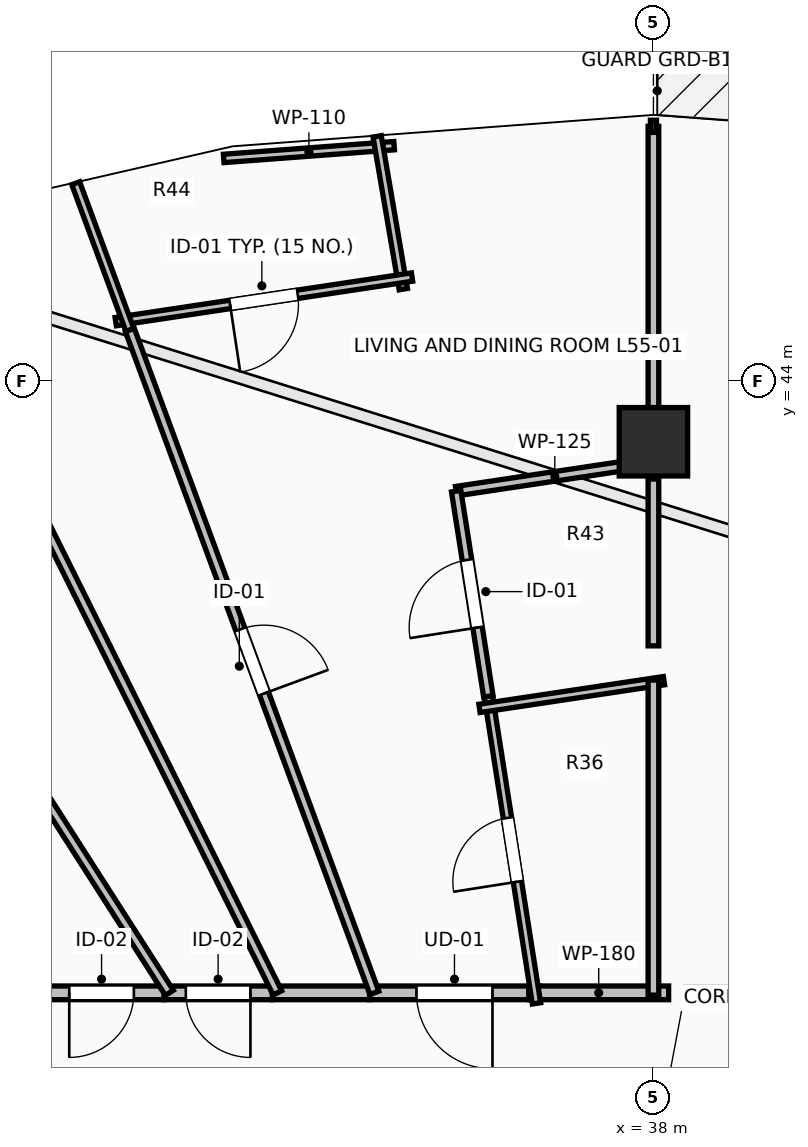
"""IFC4 building model, lengths in metres.
Left out: names, types, materials, properties, quantities, classifications, styles, units other than length and angle.
Written with IfcOpenShell. Run it as: python <this file> out.ifc"""

import sys

from ifc_helpers import new_model, si_unit, direction, frame, frame_2d, origin, origin_2d, place, context, subcontext, project, spatial, rectangle, extrude, element, fill, save


model = new_model("IFC4")
c1 = context("Model", 3, precision=1e-05, world=origin(), true_north=direction((0.0, 1.0)))
c2 = subcontext(c1, "Body", "Model", "MODEL_VIEW")
j1 = project(units=[si_unit("LENGTHUNIT", "METRE"), si_unit("PLANEANGLEUNIT", "RADIAN")], contexts=[c1])
p1 = place(None, origin())
s1 = spatial("IfcSite", under=j1, at=p1, CompositionType="ELEMENT")
p2 = place(p1, origin())
s2 = spatial("IfcBuilding", under=s1, at=p2, CompositionType="ELEMENT")
p3 = place(p2, frame((0.0, 0.0, 203.65)))
s3 = spatial("IfcBuildingStorey", under=s2, at=p3, CompositionType="ELEMENT", Elevation=203.65)
p4 = place(p3, frame((38.0, 43.2, 0.0), z_axis=(0.0, 0.0, 1.0), x_axis=(0.0, 1.0, 0.0)))
e1 = element("IfcColumn", 1, at=p4, inside=s3, PredefinedType="COLUMN", context=c2, shape_type="SweptSolid", body=[
    extrude(rectangle(XDim=0.9, YDim=0.9, at=origin_2d()), origin(), (0.0, 0.0, 1.0), 3.55),
])
p5 = place(p3, frame((36.5, 35.95, 0.0), z_axis=(0.0, 0.0, 1.0), x_axis=(-1.0, 0.0, 0.0)))
e2 = element("IfcWall", 2, at=p5, inside=s3, PredefinedType="PARTITIONING", context=c2, shape_type="SweptSolid", body=[
    extrude(rectangle(XDim=2.235, YDim=0.18, at=frame_2d((1.118, 0.0))), origin(), (0.0, 0.0, 1.0), 3.29),
])
p6 = place(p5, frame((0.617, 0.0, 0.0)))
e3 = element("IfcOpeningElement", 3, at=p6, cuts=e2, PredefinedType="OPENING", context=c2, shape_type="SweptSolid", body=[
    extrude(rectangle(XDim=1.0, YDim=2.15, at=frame_2d((0.5, 1.075))), frame((0.0, 0.105, 0.0), z_axis=(0.0, -1.0, 0.0), x_axis=(1.0, 0.0, 0.0)), (0.0, 0.0, 1.0), 0.21),
])
p7 = place(p3, frame((38.2, 35.95, 0.0), z_axis=(0.0, 0.0, 1.0), x_axis=(-1.0, 0.0, 0.0)))
e4 = element("IfcWall", 4, at=p7, inside=s3, PredefinedType="PARTITIONING", context=c2, shape_type="SweptSolid", body=[
    extrude(rectangle(XDim=1.84, YDim=0.18, at=frame_2d((0.92, 0.0))), origin(), (0.0, 0.0, 1.0), 3.29),
])
p8 = place(p3, frame((34.265, 35.95, 0.0), z_axis=(0.0, 0.0, 1.0), x_axis=(-1.0, 0.0, 0.0)))
e5 = element("IfcWall", 5, at=p8, inside=s3, PredefinedType="PARTITIONING", context=c2, shape_type="SweptSolid", body=[
    extrude(rectangle(XDim=1.279, YDim=0.18, at=frame_2d((0.639, 0.0))), origin(), (0.0, 0.0, 1.0), 3.29),
])
p9 = place(p3, frame((32.986, 35.95, 0.0), z_axis=(0.0, 0.0, 1.0), x_axis=(-1.0, 0.0, 0.0)))
e6 = element("IfcWall", 6, at=p9, inside=s3, PredefinedType="PARTITIONING", context=c2, shape_type="SweptSolid", body=[
    extrude(rectangle(XDim=1.426, YDim=0.18, at=frame_2d((0.713, 0.0))), origin(), (0.0, 0.0, 1.0), 3.29),
])
p10 = place(p9, frame((0.288, 0.0, 0.0)))
e7 = element("IfcOpeningElement", 7, at=p10, cuts=e6, PredefinedType="OPENING", context=c2, shape_type="SweptSolid", body=[
    extrude(rectangle(XDim=0.85, YDim=2.1, at=frame_2d((0.425, 1.05))), frame((0.0, 0.105, 0.0), z_axis=(0.0, -1.0, 0.0), x_axis=(1.0, 0.0, 0.0)), (0.0, 0.0, 1.0), 0.21),
])
p11 = place(p3, frame((31.56, 35.95, 0.0), z_axis=(0.0, 0.0, 1.0), x_axis=(-1.0, 0.0, 0.0)))
e8 = element("IfcWall", 8, at=p11, inside=s3, PredefinedType="PARTITIONING", context=c2, shape_type="SweptSolid", body=[
    extrude(rectangle(XDim=1.641, YDim=0.18, at=frame_2d((0.821, 0.0))), origin(), (0.0, 0.0, 1.0), 2.482),
])
p12 = place(p11, frame((0.396, 0.0, 0.0)))
e9 = element("IfcOpeningElement", 9, at=p12, cuts=e8, PredefinedType="OPENING", context=c2, shape_type="SweptSolid", body=[
    extrude(rectangle(XDim=0.85, YDim=2.1, at=frame_2d((0.425, 1.05))), frame((0.0, 0.105, 0.0), z_axis=(0.0, -1.0, 0.0), x_axis=(1.0, 0.0, 0.0)), (0.0, 0.0, 1.0), 0.21),
])
p13 = place(p3, frame((36.462, 35.812, 0.0), z_axis=(0.0, 0.0, 1.0), x_axis=(-0.154883213323, 0.987932786292, 0.0)))
e10 = element("IfcWall", 10, at=p13, inside=s3, PredefinedType="PARTITIONING", context=c2, shape_type="SweptSolid", body=[
    extrude(rectangle(XDim=4.089, YDim=0.11, at=frame_2d((2.044, 0.0))), origin(), (0.0, 0.0, 1.0), 2.936),
])
p14 = place(p13, frame((1.619, 0.0, 0.0)))
e11 = element("IfcOpeningElement", 11, at=p14, cuts=e10, PredefinedType="OPENING", context=c2, shape_type="SweptSolid", body=[
    extrude(rectangle(XDim=0.85, YDim=2.1, at=frame_2d((0.425, 1.05))), frame((0.0, 0.07, 0.0), z_axis=(0.0, -1.0, 0.0), x_axis=(1.0, 0.0, 0.0)), (0.0, 0.0, 1.0), 0.14),
])
p15 = place(p3, frame((34.589, 47.095, 0.0), z_axis=(0.0, 0.0, 1.0), x_axis=(-0.997205784552, -0.074703569226, 0.0)))
e12 = element("IfcWall", 12, at=p15, inside=s3, PredefinedType="PARTITIONING", context=c2, shape_type="SweptSolid", body=[
    extrude(rectangle(XDim=2.249, YDim=0.11, at=frame_2d((1.124, 0.0))), origin(), (0.0, 0.0, 1.0), 3.29),
])
p16 = place(p3, frame((34.365, 47.218, 0.0), z_axis=(0.0, 0.0, 1.0), x_axis=(0.168804313657, -0.985649584635, 0.0)))
e13 = element("IfcWall", 13, at=p16, inside=s3, PredefinedType="PARTITIONING", context=c2, shape_type="SweptSolid", body=[
    extrude(rectangle(XDim=2.039, YDim=0.11, at=frame_2d((1.02, 0.0))), origin(), (0.0, 0.0, 1.0), 3.29),
])
p17 = place(p3, frame((34.824, 45.367, 0.0), z_axis=(0.0, 0.0, 1.0), x_axis=(-0.988877230123, -0.148734070555, 0.0)))
e14 = element("IfcWall", 14, at=p17, inside=s3, PredefinedType="PARTITIONING", context=c2, shape_type="SweptSolid", body=[
    extrude(rectangle(XDim=3.943, YDim=0.11, at=frame_2d((1.971, 0.0))), origin(), (0.0, 0.0, 1.0), 3.29),
])
p18 = place(p17, frame((1.521, 0.0, 0.0)))
e15 = element("IfcOpeningElement", 15, at=p18, cuts=e14, PredefinedType="OPENING", context=c2, shape_type="SweptSolid", body=[
    extrude(rectangle(XDim=0.9, YDim=2.1, at=frame_2d((0.45, 1.05))), frame((0.0, 0.07, 0.0), z_axis=(0.0, -1.0, 0.0), x_axis=(1.0, 0.0, 0.0)), (0.0, 0.0, 1.0), 0.14),
])
p19 = place(p3, frame((31.113, 44.67, 0.0), z_axis=(0.0, 0.0, 1.0), x_axis=(-0.346337161188, 0.938110105894, 0.0)))
e16 = element("IfcWall", 16, at=p19, inside=s3, PredefinedType="PARTITIONING", context=c2, shape_type="SweptSolid", body=[
    extrude(rectangle(XDim=2.059, YDim=0.11, at=frame_2d((1.03, 0.0))), origin(), (0.0, 0.0, 1.0), 3.29),
])
p20 = place(p3, frame((35.405, 42.55, 0.0), z_axis=(0.0, 0.0, 1.0), x_axis=(0.988900154693, 0.148581573718, 0.0)))
e17 = element("IfcWall", 17, at=p20, inside=s3, PredefinedType="PARTITIONING", context=c2, shape_type="SweptSolid", body=[
    extrude(rectangle(XDim=2.624, YDim=0.125, at=frame_2d((1.312, 0.0))), origin(), (0.0, 0.0, 1.0), 2.482),
])
p21 = place(p3, frame((35.828, 39.851, 0.0), z_axis=(0.0, 0.0, 1.0), x_axis=(-0.154971189464, 0.987918989814, 0.0)))
e18 = element("IfcWall", 18, at=p21, inside=s3, PredefinedType="PARTITIONING", context=c2, shape_type="SweptSolid", body=[
    extrude(rectangle(XDim=2.732, YDim=0.125, at=frame_2d((1.366, 0.0))), origin(), (0.0, 0.0, 1.0), 2.482),
])
p22 = place(p21, frame((0.916, 0.0, 0.0)))
e19 = element("IfcOpeningElement", 19, at=p22, cuts=e18, PredefinedType="OPENING", context=c2, shape_type="SweptSolid", body=[
    extrude(rectangle(XDim=0.9, YDim=2.1, at=frame_2d((0.45, 1.05))), frame((0.0, 0.077, 0.0), z_axis=(0.0, -1.0, 0.0), x_axis=(1.0, 0.0, 0.0)), (0.0, 0.0, 1.0), 0.155),
])
p23 = place(p3, frame((31.112, 44.67, 0.0), z_axis=(0.0, 0.0, 1.0), x_axis=(0.346109472243, -0.938194134081, 0.0)))
e20 = element("IfcWall", 20, at=p23, inside=s3, PredefinedType="PARTITIONING", context=c2, shape_type="SweptSolid", body=[
    extrude(rectangle(XDim=9.294, YDim=0.125, at=frame_2d((4.647, 0.0))), origin(), (0.0, 0.0, 1.0), 2.482),
])
p24 = place(p23, frame((4.197, 0.0, 0.0)))
e21 = element("IfcOpeningElement", 21, at=p24, cuts=e20, PredefinedType="OPENING", context=c2, shape_type="SweptSolid", body=[
    extrude(rectangle(XDim=0.9, YDim=2.1, at=frame_2d((0.45, 1.05))), frame((0.0, 0.077, 0.0), z_axis=(0.0, -1.0, 0.0), x_axis=(1.0, 0.0, 0.0)), (0.0, 0.0, 1.0), 0.155),
])
p25 = place(p3, frame((38.138, 40.057, 0.0), z_axis=(0.0, 0.0, 1.0), x_axis=(-0.988892526147, -0.148632337431, 0.0)))
e22 = element("IfcWall", 22, at=p25, inside=s3, PredefinedType="PARTITIONING", context=c2, shape_type="SweptSolid", body=[
    extrude(rectangle(XDim=2.454, YDim=0.11, at=frame_2d((1.227, 0.0))), origin(), (0.0, 0.0, 1.0), 3.022),
])
p26 = place(p3, frame((28.091, 45.928, 0.0), z_axis=(0.0, 0.0, 1.0), x_axis=(0.445267068418, -0.895397809793, 0.0)))
e23 = element("IfcWall", 23, at=p26, inside=s3, PredefinedType="PARTITIONING", context=c2, shape_type="SweptSolid", body=[
    extrude(rectangle(XDim=11.144, YDim=0.125, at=frame_2d((5.572, 0.0))), origin(), (0.0, 0.0, 1.0), 2.482),
])
p27 = place(p3, frame((25.749, 45.138, 0.0), z_axis=(0.0, 0.0, 1.0), x_axis=(0.539168632786, -0.842197830335, 0.0)))
e24 = element("IfcWall", 24, at=p27, inside=s3, PredefinedType="PARTITIONING", context=c2, shape_type="SweptSolid", body=[
    extrude(rectangle(XDim=10.909, YDim=0.125, at=frame_2d((5.455, 0.0))), origin(), (0.0, 0.0, 1.0), 2.482),
])
p28 = place(p3, frame((47.67, 35.95, 0.0), z_axis=(0.0, 0.0, 1.0), x_axis=(-1.0, 0.0, 0.0)))
e25 = element("IfcWall", 25, at=p28, inside=s3, PredefinedType="PARTITIONING", context=c2, shape_type="SweptSolid", body=[
    extrude(rectangle(XDim=9.25, YDim=0.14, at=frame_2d((4.625, 0.0))), origin(), (0.0, 0.0, 1.0), 2.936),
])
p29 = place(p3, frame((38.0, 43.16, 0.0), z_axis=(0.0, 0.0, 1.0), x_axis=(0.0, 1.0, 0.0)))
e26 = element("IfcWall", 26, at=p29, inside=s3, PredefinedType="PARTITIONING", context=c2, shape_type="SweptSolid", body=[
    extrude(rectangle(XDim=4.19, YDim=0.14, at=frame_2d((2.095, 0.0))), origin(), (0.0, 0.0, 1.0), 3.29),
])
p30 = place(p3, frame((38.0, 35.92, 0.0), z_axis=(0.0, 0.0, 1.0), x_axis=(0.0, 1.0, 0.0)))
e27 = element("IfcWall", 27, at=p30, inside=s3, PredefinedType="PARTITIONING", context=c2, shape_type="SweptSolid", body=[
    extrude(rectangle(XDim=4.145, YDim=0.14, at=frame_2d((2.073, 0.0))), origin(), (0.0, 0.0, 1.0), 2.936),
])
p31 = place(p3, frame((38.0, 40.515, 0.0), z_axis=(0.0, 0.0, 1.0), x_axis=(0.0, 1.0, 0.0)))
e28 = element("IfcWall", 28, at=p31, inside=s3, PredefinedType="PARTITIONING", context=c2, shape_type="SweptSolid", body=[
    extrude(rectangle(XDim=2.195, YDim=0.14, at=frame_2d((1.098, 0.0))), origin(), (0.0, 0.0, 1.0), 3.29),
])
p32 = place(p6, origin())
e29 = element("IfcDoor", 29, at=p32, inside=s3, OperationType="SINGLE_SWING_LEFT", PredefinedType="DOOR", context=c2, shape_type="SweptSolid", body=[
    extrude(rectangle(XDim=1.0, YDim=2.15, at=frame_2d((0.5, 1.075))), frame((0.0, 0.025, 0.0), z_axis=(0.0, -1.0, 0.0), x_axis=(1.0, 0.0, 0.0)), (0.0, 0.0, 1.0), 0.05),
])
fill(e3, e29)
p33 = place(p14, origin())
e30 = element("IfcDoor", 30, at=p33, inside=s3, OperationType="SINGLE_SWING_LEFT", PredefinedType="DOOR", context=c2, shape_type="SweptSolid", body=[
    extrude(rectangle(XDim=0.85, YDim=2.1, at=frame_2d((0.425, 1.05))), frame((0.0, 0.025, 0.0), z_axis=(0.0, -1.0, 0.0), x_axis=(1.0, 0.0, 0.0)), (0.0, 0.0, 1.0), 0.05),
])
fill(e11, e30)
p34 = place(p18, origin())
e31 = element("IfcDoor", 31, at=p34, inside=s3, OperationType="SINGLE_SWING_RIGHT", PredefinedType="DOOR", context=c2, shape_type="SweptSolid", body=[
    extrude(rectangle(XDim=0.9, YDim=2.1, at=frame_2d((0.45, 1.05))), frame((0.0, 0.025, 0.0), z_axis=(0.0, -1.0, 0.0), x_axis=(1.0, 0.0, 0.0)), (0.0, 0.0, 1.0), 0.05),
])
fill(e15, e31)
p35 = place(p22, origin())
e32 = element("IfcDoor", 32, at=p35, inside=s3, OperationType="SINGLE_SWING_LEFT", PredefinedType="DOOR", context=c2, shape_type="SweptSolid", body=[
    extrude(rectangle(XDim=0.9, YDim=2.1, at=frame_2d((0.45, 1.05))), frame((0.0, 0.025, 0.0), z_axis=(0.0, -1.0, 0.0), x_axis=(1.0, 0.0, 0.0)), (0.0, 0.0, 1.0), 0.05),
])
fill(e19, e32)
p36 = place(p24, origin())
e33 = element("IfcDoor", 33, at=p36, inside=s3, OperationType="SINGLE_SWING_RIGHT", PredefinedType="DOOR", context=c2, shape_type="SweptSolid", body=[
    extrude(rectangle(XDim=0.9, YDim=2.1, at=frame_2d((0.45, 1.05))), frame((0.0, 0.025, 0.0), z_axis=(0.0, -1.0, 0.0), x_axis=(1.0, 0.0, 0.0)), (0.0, 0.0, 1.0), 0.05),
])
fill(e21, e33)
p37 = place(p10, origin())
e34 = element("IfcDoor", 34, at=p37, inside=s3, OperationType="SINGLE_SWING_LEFT", PredefinedType="DOOR", context=c2, shape_type="SweptSolid", body=[
    extrude(rectangle(XDim=0.85, YDim=2.1, at=frame_2d((0.425, 1.05))), frame((0.0, 0.025, 0.0), z_axis=(0.0, -1.0, 0.0), x_axis=(1.0, 0.0, 0.0)), (0.0, 0.0, 1.0), 0.05),
])
fill(e7, e34)
p38 = place(p12, origin())
e35 = element("IfcDoor", 35, at=p38, inside=s3, OperationType="SINGLE_SWING_RIGHT", PredefinedType="DOOR", context=c2, shape_type="SweptSolid", body=[
    extrude(rectangle(XDim=0.85, YDim=2.1, at=frame_2d((0.425, 1.05))), frame((0.0, 0.025, 0.0), z_axis=(0.0, -1.0, 0.0), x_axis=(1.0, 0.0, 0.0)), (0.0, 0.0, 1.0), 0.05),
])
fill(e9, e35)
save(model, sys.argv[1])
